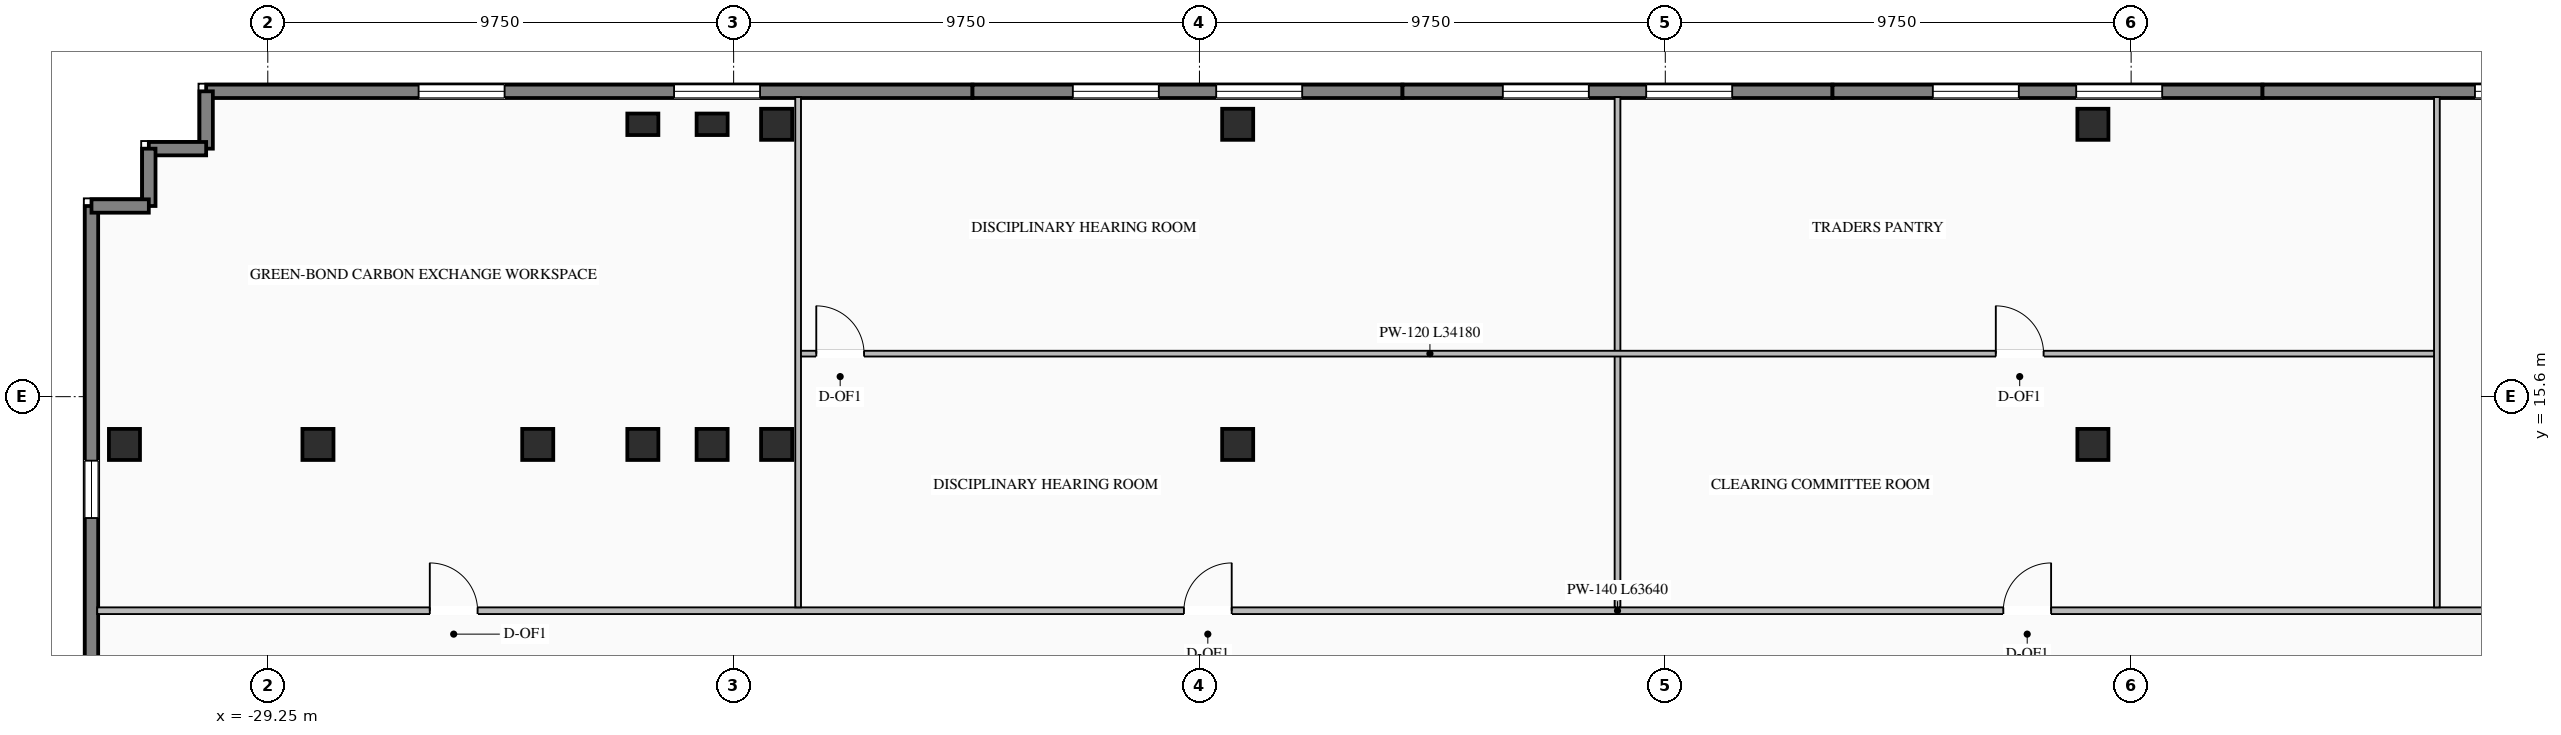
"""IFC4 building model, lengths in metres.
Left out: names, types, materials, properties, quantities, classifications, styles, units other than length and angle.
Written with IfcOpenShell. Run it as: python <this file> out.ifc"""

import sys

from ifc_helpers import new_model, si_unit, direction, frame, frame_2d, origin, origin_2d, place, context, subcontext, project, spatial, rectangle, i_section, extrude, element, fill, save


model = new_model("IFC4")
c1 = context("Model", 3, precision=1e-05, world=origin(), true_north=direction((0.0, 1.0)))
c2 = subcontext(c1, "Body", "Model", "MODEL_VIEW")
j1 = project(units=[si_unit("LENGTHUNIT", "METRE"), si_unit("PLANEANGLEUNIT", "RADIAN")], contexts=[c1])
p1 = place(None, origin())
s1 = spatial("IfcSite", under=j1, at=p1, CompositionType="ELEMENT")
p2 = place(p1, origin())
s2 = spatial("IfcBuilding", under=s1, at=p2, CompositionType="ELEMENT")
p3 = place(p2, frame((0.0, 0.0, 141.55)))
s3 = spatial("IfcBuildingStorey", under=s2, at=p3, CompositionType="ELEMENT", Elevation=141.55)
for number, where, z_axis, x_axis in (
    (1, (-21.4, 14.6, 0.0), (0.0, 0.0, 1.0), (1.0, 0.0, 0.0)),
    (2, (-19.95, 14.6, 0.0), (0.0, 0.0, 1.0), (1.0, 0.0, 0.0)),
    (3, (-18.6, 14.6, 0.0), (0.0, 0.0, 1.0), (1.0, 0.0, 0.0)),
    (4, (-8.95, 14.6, 0.0), (0.0, 0.0, 1.0), (1.0, 0.0, 0.0)),
    (5, (8.95, 14.6, 0.0), (0.0, 0.0, 1.0), (1.0, 0.0, 0.0)),
    (6, (-23.6, 14.6, 0.0), (0.0, 0.0, 1.0), (1.0, 0.0, 0.0)),
    (7, (-28.2, 14.6, 0.0), (0.0, 0.0, 1.0), (1.0, 0.0, 0.0)),
    (8, (-18.6, 21.3, 0.0), (0.0, 0.0, 1.0), (1.0, 0.0, 0.0)),
    (9, (-8.95, 21.3, 0.0), (0.0, 0.0, 1.0), (1.0, 0.0, 0.0)),
    (10, (8.95, 21.3, 0.0), (0.0, 0.0, 1.0), (1.0, 0.0, 0.0)),
    (11, (-32.25, 14.6, 0.0), (0.0, 0.0, 1.0), (1.0, 0.0, 0.0)),
):
    element("IfcColumn", number, at=place(p3, frame(where, z_axis=z_axis, x_axis=x_axis)), inside=s3, PredefinedType="COLUMN", context=c2, shape_type="SweptSolid", body=[
        extrude(i_section(OverallWidth=0.65, OverallDepth=0.65, WebThickness=0.028, FlangeThickness=0.04, at=origin_2d()), origin(), (0.0, 0.0, 1.0), 3.45),
    ])
for number, where, z_axis, x_axis in (
    (12, (-21.4, 21.3, 0.0), (0.0, 0.0, 1.0), (1.0, 0.0, 0.0)),
    (13, (-19.95, 21.3, 0.0), (0.0, 0.0, 1.0), (1.0, 0.0, 0.0)),
):
    element("IfcColumn", number, at=place(p3, frame(where, z_axis=z_axis, x_axis=x_axis)), inside=s3, PredefinedType="PILASTER", context=c2, shape_type="SweptSolid", body=[
        extrude(rectangle(XDim=0.65, YDim=0.45, at=origin_2d()), origin(), (0.0, 0.0, 1.0), 3.45),
    ])
p4 = place(p3, frame((-30.54, 21.99, 0.0), z_axis=(0.0, 0.0, 1.0), x_axis=(1.0, 0.0, 0.0)))
e14 = element("IfcWall", 14, at=p4, inside=s3, PredefinedType="STANDARD", context=c2, shape_type="SweptSolid", body=[
    extrude(rectangle(XDim=16.04, YDim=0.28, at=frame_2d((8.02, 0.0))), origin(), (0.0, 0.0, 1.0), 3.25),
])
p5 = place(p4, frame((4.447, 0.0, 0.76)))
e15 = element("IfcOpeningElement", 15, at=p5, cuts=e14, PredefinedType="OPENING", context=c2, shape_type="SweptSolid", body=[
    extrude(rectangle(XDim=1.8, YDim=1.95, at=frame_2d((0.9, 0.975))), frame((0.0, 0.15, 0.0), z_axis=(0.0, -1.0, 0.0), x_axis=(1.0, 0.0, 0.0)), (0.0, 0.0, 1.0), 0.3),
])
p6 = place(p4, frame((9.793, 0.0, 0.76)))
e16 = element("IfcOpeningElement", 16, at=p6, cuts=e14, PredefinedType="OPENING", context=c2, shape_type="SweptSolid", body=[
    extrude(rectangle(XDim=1.8, YDim=1.95, at=frame_2d((0.9, 0.975))), frame((0.0, 0.15, 0.0), z_axis=(0.0, -1.0, 0.0), x_axis=(1.0, 0.0, 0.0)), (0.0, 0.0, 1.0), 0.3),
])
p7 = place(p3, frame((-14.5, 21.99, 0.0), z_axis=(0.0, 0.0, 1.0), x_axis=(1.0, 0.0, 0.0)))
e17 = element("IfcWall", 17, at=p7, inside=s3, PredefinedType="STANDARD", context=c2, shape_type="SweptSolid", body=[
    extrude(rectangle(XDim=9.0, YDim=0.28, at=frame_2d((4.5, 0.0))), origin(), (0.0, 0.0, 1.0), 3.25),
])
p8 = place(p7, frame((2.1, 0.0, 0.76)))
e18 = element("IfcOpeningElement", 18, at=p8, cuts=e17, PredefinedType="OPENING", context=c2, shape_type="SweptSolid", body=[
    extrude(rectangle(XDim=1.8, YDim=1.95, at=frame_2d((0.9, 0.975))), frame((0.0, 0.15, 0.0), z_axis=(0.0, -1.0, 0.0), x_axis=(1.0, 0.0, 0.0)), (0.0, 0.0, 1.0), 0.3),
])
p9 = place(p7, frame((5.1, 0.0, 0.76)))
e19 = element("IfcOpeningElement", 19, at=p9, cuts=e17, PredefinedType="OPENING", context=c2, shape_type="SweptSolid", body=[
    extrude(rectangle(XDim=1.8, YDim=1.95, at=frame_2d((0.9, 0.975))), frame((0.0, 0.15, 0.0), z_axis=(0.0, -1.0, 0.0), x_axis=(1.0, 0.0, 0.0)), (0.0, 0.0, 1.0), 0.3),
])
p10 = place(p3, frame((-5.5, 21.99, 0.0), z_axis=(0.0, 0.0, 1.0), x_axis=(1.0, 0.0, 0.0)))
e20 = element("IfcWall", 20, at=p10, inside=s3, PredefinedType="STANDARD", context=c2, shape_type="SweptSolid", body=[
    extrude(rectangle(XDim=9.0, YDim=0.28, at=frame_2d((4.5, 0.0))), origin(), (0.0, 0.0, 1.0), 3.25),
])
p11 = place(p10, frame((2.1, 0.0, 0.76)))
e21 = element("IfcOpeningElement", 21, at=p11, cuts=e20, PredefinedType="OPENING", context=c2, shape_type="SweptSolid", body=[
    extrude(rectangle(XDim=1.8, YDim=1.95, at=frame_2d((0.9, 0.975))), frame((0.0, 0.15, 0.0), z_axis=(0.0, -1.0, 0.0), x_axis=(1.0, 0.0, 0.0)), (0.0, 0.0, 1.0), 0.3),
])
p12 = place(p10, frame((5.1, 0.0, 0.76)))
e22 = element("IfcOpeningElement", 22, at=p12, cuts=e20, PredefinedType="OPENING", context=c2, shape_type="SweptSolid", body=[
    extrude(rectangle(XDim=1.8, YDim=1.95, at=frame_2d((0.9, 0.975))), frame((0.0, 0.15, 0.0), z_axis=(0.0, -1.0, 0.0), x_axis=(1.0, 0.0, 0.0)), (0.0, 0.0, 1.0), 0.3),
])
p13 = place(p3, frame((3.5, 21.99, 0.0), z_axis=(0.0, 0.0, 1.0), x_axis=(1.0, 0.0, 0.0)))
e23 = element("IfcWall", 23, at=p13, inside=s3, PredefinedType="STANDARD", context=c2, shape_type="SweptSolid", body=[
    extrude(rectangle(XDim=9.0, YDim=0.28, at=frame_2d((4.5, 0.0))), origin(), (0.0, 0.0, 1.0), 3.25),
])
p14 = place(p13, frame((2.1, 0.0, 0.76)))
e24 = element("IfcOpeningElement", 24, at=p14, cuts=e23, PredefinedType="OPENING", context=c2, shape_type="SweptSolid", body=[
    extrude(rectangle(XDim=1.8, YDim=1.95, at=frame_2d((0.9, 0.975))), frame((0.0, 0.15, 0.0), z_axis=(0.0, -1.0, 0.0), x_axis=(1.0, 0.0, 0.0)), (0.0, 0.0, 1.0), 0.3),
])
p15 = place(p13, frame((5.1, 0.0, 0.76)))
e25 = element("IfcOpeningElement", 25, at=p15, cuts=e23, PredefinedType="OPENING", context=c2, shape_type="SweptSolid", body=[
    extrude(rectangle(XDim=1.8, YDim=1.95, at=frame_2d((0.9, 0.975))), frame((0.0, 0.15, 0.0), z_axis=(0.0, -1.0, 0.0), x_axis=(1.0, 0.0, 0.0)), (0.0, 0.0, 1.0), 0.3),
])
p16 = place(p3, frame((12.5, 21.99, 0.0), z_axis=(0.0, 0.0, 1.0), x_axis=(1.0, 0.0, 0.0)))
e26 = element("IfcWall", 26, at=p16, inside=s3, PredefinedType="STANDARD", context=c2, shape_type="SweptSolid", body=[
    extrude(rectangle(XDim=16.04, YDim=0.28, at=frame_2d((8.02, 0.0))), origin(), (0.0, 0.0, 1.0), 3.25),
])
p17 = place(p16, frame((4.447, 0.0, 0.76)))
e27 = element("IfcOpeningElement", 27, at=p17, cuts=e26, PredefinedType="OPENING", context=c2, shape_type="SweptSolid", body=[
    extrude(rectangle(XDim=1.8, YDim=1.95, at=frame_2d((0.9, 0.975))), frame((0.0, 0.15, 0.0), z_axis=(0.0, -1.0, 0.0), x_axis=(1.0, 0.0, 0.0)), (0.0, 0.0, 1.0), 0.3),
])
p18 = place(p16, frame((9.793, 0.0, 0.76)))
e28 = element("IfcOpeningElement", 28, at=p18, cuts=e26, PredefinedType="OPENING", context=c2, shape_type="SweptSolid", body=[
    extrude(rectangle(XDim=1.8, YDim=1.95, at=frame_2d((0.9, 0.975))), frame((0.0, 0.15, 0.0), z_axis=(0.0, -1.0, 0.0), x_axis=(1.0, 0.0, 0.0)), (0.0, 0.0, 1.0), 0.3),
])
p19 = place(p3, frame((-32.94, 1.8, 0.0), z_axis=(0.0, 0.0, 1.0), x_axis=(0.0, 1.0, 0.0)))
e29 = element("IfcWall", 29, at=p19, inside=s3, PredefinedType="STANDARD", context=c2, shape_type="SweptSolid", body=[
    extrude(rectangle(XDim=17.79, YDim=0.28, at=frame_2d((8.895, 0.0))), origin(), (0.0, 0.0, 1.0), 3.25),
])
p20 = place(p19, frame((5.33, 0.0, 0.76)))
e30 = element("IfcOpeningElement", 30, at=p20, cuts=e29, PredefinedType="OPENING", context=c2, shape_type="SweptSolid", body=[
    extrude(rectangle(XDim=1.2, YDim=1.95, at=frame_2d((0.6, 0.975))), frame((0.0, 0.15, 0.0), z_axis=(0.0, -1.0, 0.0), x_axis=(1.0, 0.0, 0.0)), (0.0, 0.0, 1.0), 0.3),
])
p21 = place(p19, frame((11.26, 0.0, 0.76)))
e31 = element("IfcOpeningElement", 31, at=p21, cuts=e29, PredefinedType="OPENING", context=c2, shape_type="SweptSolid", body=[
    extrude(rectangle(XDim=1.2, YDim=1.95, at=frame_2d((0.6, 0.975))), frame((0.0, 0.15, 0.0), z_axis=(0.0, -1.0, 0.0), x_axis=(1.0, 0.0, 0.0)), (0.0, 0.0, 1.0), 0.3),
])
for number, where, z_axis, x_axis in (
    (32, (-30.54, 21.99, 0.0), (0.0, 0.0, 1.0), (0.0, -1.0, 0.0)),
    (33, (-30.54, 20.79, 0.0), (0.0, 0.0, 1.0), (-1.0, 0.0, 0.0)),
    (34, (-31.74, 20.79, 0.0), (0.0, 0.0, 1.0), (0.0, -1.0, 0.0)),
    (35, (-31.74, 19.59, 0.0), (0.0, 0.0, 1.0), (-1.0, 0.0, 0.0)),
):
    element("IfcWall", number, at=place(p3, frame(where, z_axis=z_axis, x_axis=x_axis)), inside=s3, PredefinedType="STANDARD", context=c2, shape_type="SweptSolid", body=[
        extrude(rectangle(XDim=1.2, YDim=0.28, at=frame_2d((0.6, 0.0))), origin(), (0.0, 0.0, 1.0), 3.25),
    ])
p22 = place(p3, frame((-32.82, 11.12, 0.0), z_axis=(0.0, 0.0, 1.0), x_axis=(1.0, 0.0, 0.0)))
e36 = element("IfcWall", 36, at=p22, inside=s3, PredefinedType="STANDARD", context=c2, shape_type="SweptSolid", body=[
    extrude(rectangle(XDim=63.64, YDim=0.14, at=frame_2d((31.82, 0.0))), origin(), (0.0, 0.0, 1.0), 3.25),
])
p23 = place(p22, frame((6.961, 0.0, 0.0)))
e37 = element("IfcOpeningElement", 37, at=p23, cuts=e36, PredefinedType="OPENING", context=c2, shape_type="SweptSolid", body=[
    extrude(rectangle(XDim=1.0, YDim=2.08, at=frame_2d((0.5, 1.04))), frame((0.0, 0.08, 0.0), z_axis=(0.0, -1.0, 0.0), x_axis=(1.0, 0.0, 0.0)), (0.0, 0.0, 1.0), 0.16),
])
p24 = place(p22, frame((22.745, 0.0, 0.0)))
e38 = element("IfcOpeningElement", 38, at=p24, cuts=e36, PredefinedType="OPENING", context=c2, shape_type="SweptSolid", body=[
    extrude(rectangle(XDim=1.0, YDim=2.08, at=frame_2d((0.5, 1.04))), frame((0.0, 0.08, 0.0), z_axis=(0.0, -1.0, 0.0), x_axis=(1.0, 0.0, 0.0)), (0.0, 0.0, 1.0), 0.16),
])
p25 = place(p22, frame((39.895, 0.0, 0.0)))
e39 = element("IfcOpeningElement", 39, at=p25, cuts=e36, PredefinedType="OPENING", context=c2, shape_type="SweptSolid", body=[
    extrude(rectangle(XDim=1.0, YDim=2.08, at=frame_2d((0.5, 1.04))), frame((0.0, 0.08, 0.0), z_axis=(0.0, -1.0, 0.0), x_axis=(1.0, 0.0, 0.0)), (0.0, 0.0, 1.0), 0.16),
])
p26 = place(p22, frame((55.679, 0.0, 0.0)))
e40 = element("IfcOpeningElement", 40, at=p26, cuts=e36, PredefinedType="OPENING", context=c2, shape_type="SweptSolid", body=[
    extrude(rectangle(XDim=1.0, YDim=2.08, at=frame_2d((0.5, 1.04))), frame((0.0, 0.08, 0.0), z_axis=(0.0, -1.0, 0.0), x_axis=(1.0, 0.0, 0.0)), (0.0, 0.0, 1.0), 0.16),
])
for number, where, z_axis, x_axis in (
    (41, (-18.15, 11.19, 0.0), (0.0, 0.0, 1.0), (0.0, 1.0, 0.0)),
    (42, (-1.0, 11.19, 0.0), (0.0, 0.0, 1.0), (0.0, 1.0, 0.0)),
    (43, (16.15, 11.19, 0.0), (0.0, 0.0, 1.0), (0.0, 1.0, 0.0)),
):
    element("IfcWall", number, at=place(p3, frame(where, z_axis=z_axis, x_axis=x_axis)), inside=s3, PredefinedType="STANDARD", context=c2, shape_type="SweptSolid", body=[
        extrude(rectangle(XDim=10.68, YDim=0.12, at=frame_2d((5.34, 0.0))), origin(), (0.0, 0.0, 1.0), 3.25),
    ])
p27 = place(p3, frame((-18.09, 16.5, 0.0), z_axis=(0.0, 0.0, 1.0), x_axis=(1.0, 0.0, 0.0)))
e44 = element("IfcWall", 44, at=p27, inside=s3, PredefinedType="STANDARD", context=c2, shape_type="SweptSolid", body=[
    extrude(rectangle(XDim=34.18, YDim=0.12, at=frame_2d((17.09, 0.0))), origin(), (0.0, 0.0, 1.0), 3.25),
])
p28 = place(p27, frame((0.32, 0.0, 0.0)))
e45 = element("IfcOpeningElement", 45, at=p28, cuts=e44, PredefinedType="OPENING", context=c2, shape_type="SweptSolid", body=[
    extrude(rectangle(XDim=1.0, YDim=2.08, at=frame_2d((0.5, 1.04))), frame((0.0, 0.07, 0.0), z_axis=(0.0, -1.0, 0.0), x_axis=(1.0, 0.0, 0.0)), (0.0, 0.0, 1.0), 0.14),
])
p29 = place(p27, frame((25.008, 0.0, 0.0)))
e46 = element("IfcOpeningElement", 46, at=p29, cuts=e44, PredefinedType="OPENING", context=c2, shape_type="SweptSolid", body=[
    extrude(rectangle(XDim=1.0, YDim=2.08, at=frame_2d((0.5, 1.04))), frame((0.0, 0.07, 0.0), z_axis=(0.0, -1.0, 0.0), x_axis=(1.0, 0.0, 0.0)), (0.0, 0.0, 1.0), 0.14),
])
p30 = place(p5, origin())
e47 = element("IfcWindow", 47, at=p30, inside=s3, PartitioningType="SINGLE_PANEL", PredefinedType="WINDOW", context=c2, shape_type="SweptSolid", body=[
    extrude(rectangle(XDim=1.8, YDim=1.95, at=frame_2d((0.9, 0.975))), frame((0.0, 0.03, 0.0), z_axis=(0.0, -1.0, 0.0), x_axis=(1.0, 0.0, 0.0)), (0.0, 0.0, 1.0), 0.06),
])
fill(e15, e47)
p31 = place(p6, origin())
e48 = element("IfcWindow", 48, at=p31, inside=s3, PartitioningType="SINGLE_PANEL", PredefinedType="WINDOW", context=c2, shape_type="SweptSolid", body=[
    extrude(rectangle(XDim=1.8, YDim=1.95, at=frame_2d((0.9, 0.975))), frame((0.0, 0.03, 0.0), z_axis=(0.0, -1.0, 0.0), x_axis=(1.0, 0.0, 0.0)), (0.0, 0.0, 1.0), 0.06),
])
fill(e16, e48)
p32 = place(p8, origin())
e49 = element("IfcWindow", 49, at=p32, inside=s3, PartitioningType="SINGLE_PANEL", PredefinedType="WINDOW", context=c2, shape_type="SweptSolid", body=[
    extrude(rectangle(XDim=1.8, YDim=1.95, at=frame_2d((0.9, 0.975))), frame((0.0, 0.03, 0.0), z_axis=(0.0, -1.0, 0.0), x_axis=(1.0, 0.0, 0.0)), (0.0, 0.0, 1.0), 0.06),
])
fill(e18, e49)
p33 = place(p9, origin())
e50 = element("IfcWindow", 50, at=p33, inside=s3, PartitioningType="SINGLE_PANEL", PredefinedType="WINDOW", context=c2, shape_type="SweptSolid", body=[
    extrude(rectangle(XDim=1.8, YDim=1.95, at=frame_2d((0.9, 0.975))), frame((0.0, 0.03, 0.0), z_axis=(0.0, -1.0, 0.0), x_axis=(1.0, 0.0, 0.0)), (0.0, 0.0, 1.0), 0.06),
])
fill(e19, e50)
p34 = place(p11, origin())
e51 = element("IfcWindow", 51, at=p34, inside=s3, PartitioningType="SINGLE_PANEL", PredefinedType="WINDOW", context=c2, shape_type="SweptSolid", body=[
    extrude(rectangle(XDim=1.8, YDim=1.95, at=frame_2d((0.9, 0.975))), frame((0.0, 0.03, 0.0), z_axis=(0.0, -1.0, 0.0), x_axis=(1.0, 0.0, 0.0)), (0.0, 0.0, 1.0), 0.06),
])
fill(e21, e51)
p35 = place(p12, origin())
e52 = element("IfcWindow", 52, at=p35, inside=s3, PartitioningType="SINGLE_PANEL", PredefinedType="WINDOW", context=c2, shape_type="SweptSolid", body=[
    extrude(rectangle(XDim=1.8, YDim=1.95, at=frame_2d((0.9, 0.975))), frame((0.0, 0.03, 0.0), z_axis=(0.0, -1.0, 0.0), x_axis=(1.0, 0.0, 0.0)), (0.0, 0.0, 1.0), 0.06),
])
fill(e22, e52)
p36 = place(p14, origin())
e53 = element("IfcWindow", 53, at=p36, inside=s3, PartitioningType="SINGLE_PANEL", PredefinedType="WINDOW", context=c2, shape_type="SweptSolid", body=[
    extrude(rectangle(XDim=1.8, YDim=1.95, at=frame_2d((0.9, 0.975))), frame((0.0, 0.03, 0.0), z_axis=(0.0, -1.0, 0.0), x_axis=(1.0, 0.0, 0.0)), (0.0, 0.0, 1.0), 0.06),
])
fill(e24, e53)
p37 = place(p15, origin())
e54 = element("IfcWindow", 54, at=p37, inside=s3, PartitioningType="SINGLE_PANEL", PredefinedType="WINDOW", context=c2, shape_type="SweptSolid", body=[
    extrude(rectangle(XDim=1.8, YDim=1.95, at=frame_2d((0.9, 0.975))), frame((0.0, 0.03, 0.0), z_axis=(0.0, -1.0, 0.0), x_axis=(1.0, 0.0, 0.0)), (0.0, 0.0, 1.0), 0.06),
])
fill(e25, e54)
p38 = place(p17, origin())
e55 = element("IfcWindow", 55, at=p38, inside=s3, PartitioningType="SINGLE_PANEL", PredefinedType="WINDOW", context=c2, shape_type="SweptSolid", body=[
    extrude(rectangle(XDim=1.8, YDim=1.95, at=frame_2d((0.9, 0.975))), frame((0.0, 0.03, 0.0), z_axis=(0.0, -1.0, 0.0), x_axis=(1.0, 0.0, 0.0)), (0.0, 0.0, 1.0), 0.06),
])
fill(e27, e55)
p39 = place(p21, origin())
e56 = element("IfcWindow", 56, at=p39, inside=s3, PartitioningType="SINGLE_PANEL", PredefinedType="WINDOW", context=c2, shape_type="SweptSolid", body=[
    extrude(rectangle(XDim=1.2, YDim=1.95, at=frame_2d((0.6, 0.975))), frame((0.0, 0.03, 0.0), z_axis=(0.0, -1.0, 0.0), x_axis=(1.0, 0.0, 0.0)), (0.0, 0.0, 1.0), 0.06),
])
fill(e31, e56)
p40 = place(p23, origin())
e57 = element("IfcDoor", 57, at=p40, inside=s3, OperationType="SINGLE_SWING_LEFT", PredefinedType="DOOR", context=c2, shape_type="SweptSolid", body=[
    extrude(rectangle(XDim=1.0, YDim=2.08, at=frame_2d((0.5, 1.04))), frame((0.0, 0.025, 0.0), z_axis=(0.0, -1.0, 0.0), x_axis=(1.0, 0.0, 0.0)), (0.0, 0.0, 1.0), 0.05),
])
fill(e37, e57)
p41 = place(p24, origin())
e58 = element("IfcDoor", 58, at=p41, inside=s3, OperationType="SINGLE_SWING_RIGHT", PredefinedType="DOOR", context=c2, shape_type="SweptSolid", body=[
    extrude(rectangle(XDim=1.0, YDim=2.08, at=frame_2d((0.5, 1.04))), frame((0.0, 0.025, 0.0), z_axis=(0.0, -1.0, 0.0), x_axis=(1.0, 0.0, 0.0)), (0.0, 0.0, 1.0), 0.05),
])
fill(e38, e58)
p42 = place(p28, origin())
e59 = element("IfcDoor", 59, at=p42, inside=s3, OperationType="SINGLE_SWING_LEFT", PredefinedType="DOOR", context=c2, shape_type="SweptSolid", body=[
    extrude(rectangle(XDim=1.0, YDim=2.08, at=frame_2d((0.5, 1.04))), frame((0.0, 0.025, 0.0), z_axis=(0.0, -1.0, 0.0), x_axis=(1.0, 0.0, 0.0)), (0.0, 0.0, 1.0), 0.05),
])
fill(e45, e59)
p43 = place(p25, origin())
e60 = element("IfcDoor", 60, at=p43, inside=s3, OperationType="SINGLE_SWING_RIGHT", PredefinedType="DOOR", context=c2, shape_type="SweptSolid", body=[
    extrude(rectangle(XDim=1.0, YDim=2.08, at=frame_2d((0.5, 1.04))), frame((0.0, 0.025, 0.0), z_axis=(0.0, -1.0, 0.0), x_axis=(1.0, 0.0, 0.0)), (0.0, 0.0, 1.0), 0.05),
])
fill(e39, e60)
p44 = place(p29, origin())
e61 = element("IfcDoor", 61, at=p44, inside=s3, OperationType="SINGLE_SWING_LEFT", PredefinedType="DOOR", context=c2, shape_type="SweptSolid", body=[
    extrude(rectangle(XDim=1.0, YDim=2.08, at=frame_2d((0.5, 1.04))), frame((0.0, 0.025, 0.0), z_axis=(0.0, -1.0, 0.0), x_axis=(1.0, 0.0, 0.0)), (0.0, 0.0, 1.0), 0.05),
])
fill(e46, e61)
save(model, sys.argv[1])
